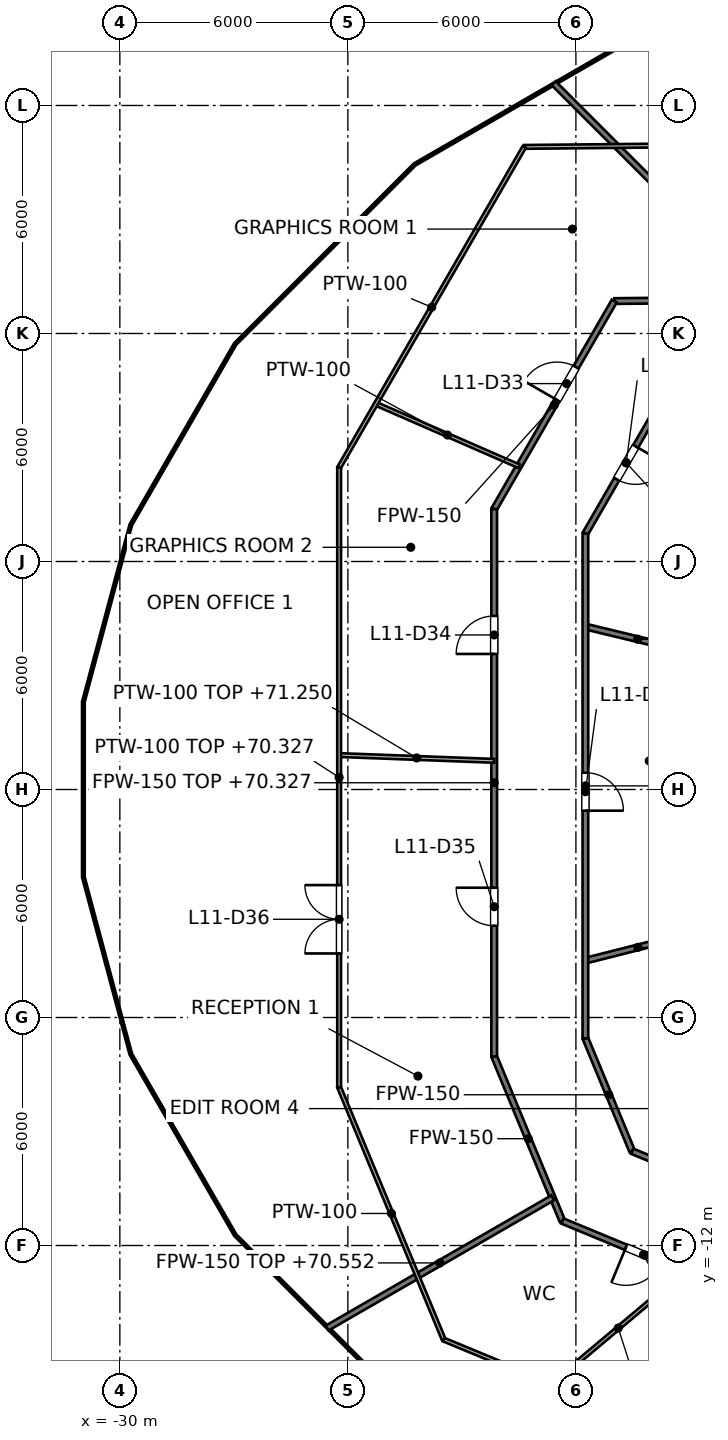
"""IFC4 building model, lengths in metres.
Left out: names, types, materials, properties, quantities, classifications, styles, units other than length and angle.
Written with IfcOpenShell. Run it as: python <this file> out.ifc"""

import sys

from ifc_helpers import new_model, si_unit, direction, frame, frame_2d, origin, place, context, subcontext, project, spatial, rectangle, extrude, element, fill, save


model = new_model("IFC4")
c1 = context("Model", 3, precision=1e-05, world=origin(), true_north=direction((0.0, 1.0)))
c2 = subcontext(c1, "Body", "Model", "MODEL_VIEW")
j1 = project(units=[si_unit("LENGTHUNIT", "METRE"), si_unit("PLANEANGLEUNIT", "RADIAN")], contexts=[c1])
p1 = place(None, origin())
s1 = spatial("IfcSite", under=j1, at=p1, CompositionType="ELEMENT")
p2 = place(p1, origin())
s2 = spatial("IfcBuilding", under=s1, at=p2, CompositionType="ELEMENT")
p3 = place(p2, frame((0.0, 0.0, 67.2)))
s3 = spatial("IfcBuildingStorey", under=s2, at=p3, CompositionType="ELEMENT", Elevation=67.2)
p4 = place(p3, frame((-20.15, -7.025, 0.0), z_axis=(0.0, 0.0, 1.0), x_axis=(0.382713655067, -0.923867013279, 0.0)))
e1 = element("IfcWall", 1, at=p4, inside=s3, PredefinedType="PARTITIONING", context=c2, shape_type="SweptSolid", body=[
    extrude(rectangle(XDim=4.688, YDim=0.15, at=frame_2d((2.344, 0.0))), origin(), (0.0, 0.0, 1.0), 3.195),
])
p5 = place(p3, frame((-17.75, -6.547, 0.0), z_axis=(0.0, 0.0, 1.0), x_axis=(0.382760687394, -0.923847528646, 0.0)))
e2 = element("IfcWall", 2, at=p5, inside=s3, PredefinedType="PARTITIONING", context=c2, shape_type="SweptSolid", body=[
    extrude(rectangle(XDim=3.217, YDim=0.15, at=frame_2d((1.608, 0.0))), origin(), (0.0, 0.0, 1.0), 3.195),
])
p6 = place(p3, frame((-18.584, 18.584, 0.0), z_axis=(0.0, 0.0, 1.0), x_axis=(0.707106781187, -0.707106781187, 0.0)))
e3 = element("IfcWall", 3, at=p6, inside=s3, PredefinedType="PARTITIONING", context=c2, shape_type="SweptSolid", body=[
    extrude(rectangle(XDim=8.047, YDim=0.15, at=frame_2d((4.023, 0.0))), origin(), (0.0, 0.0, 1.0), 3.276),
])
p7 = place(p3, frame((-18.355, -11.355, 0.0), z_axis=(0.0, 0.0, 1.0), x_axis=(0.923864073191, -0.382720752334, 0.0)))
e4 = element("IfcWall", 4, at=p7, inside=s3, PredefinedType="PARTITIONING", context=c2, shape_type="SweptSolid", body=[
    extrude(rectangle(XDim=4.714, YDim=0.15, at=frame_2d((2.357, 0.0))), origin(), (0.0, 0.0, 1.0), 3.195),
])
p8 = place(p7, frame((1.81, 0.0, 0.0)))
e5 = element("IfcOpeningElement", 5, at=p8, cuts=e4, PredefinedType="OPENING", context=c2, shape_type="SweptSolid", body=[
    extrude(rectangle(XDim=1.0, YDim=2.1, at=frame_2d((0.5, 1.05))), frame((0.0, 0.075, 0.0), z_axis=(0.0, -1.0, 0.0), x_axis=(1.0, 0.0, 0.0)), (0.0, 0.0, 1.0), 0.15),
])
p9 = place(p3, frame((-16.519, -9.519, 0.0), z_axis=(0.0, 0.0, 1.0), x_axis=(0.92385749043, -0.382736642322, 0.0)))
e6 = element("IfcWall", 6, at=p9, inside=s3, PredefinedType="PARTITIONING", context=c2, shape_type="SweptSolid", body=[
    extrude(rectangle(XDim=3.231, YDim=0.15, at=frame_2d((1.615, 0.0))), origin(), (0.0, 0.0, 1.0), 3.195),
])
p10 = place(p9, frame((1.113, 0.0, 0.0)))
e7 = element("IfcOpeningElement", 7, at=p10, cuts=e6, PredefinedType="OPENING", context=c2, shape_type="SweptSolid", body=[
    extrude(rectangle(XDim=1.0, YDim=2.1, at=frame_2d((0.5, 1.05))), frame((0.0, 0.075, 0.0), z_axis=(0.0, -1.0, 0.0), x_axis=(1.0, 0.0, 0.0)), (0.0, 0.0, 1.0), 0.15),
])
p11 = place(p3, frame((-17.75, 4.288, 0.0), z_axis=(0.0, 0.0, 1.0), x_axis=(0.972001384863, -0.234975121714, 0.0)))
e8 = element("IfcWall", 8, at=p11, inside=s3, PredefinedType="PARTITIONING", context=c2, shape_type="SweptSolid", body=[
    extrude(rectangle(XDim=2.829, YDim=0.15, at=frame_2d((1.415, 0.0))), origin(), (0.0, 0.0, 1.0), 3.127),
])
p12 = place(p3, frame((-16.99, 12.853, 0.0), z_axis=(0.0, 0.0, 1.0), x_axis=(0.999950928474, 0.009906596006, 0.0)))
e9 = element("IfcWall", 9, at=p12, inside=s3, PredefinedType="PARTITIONING", context=c2, shape_type="SweptSolid", body=[
    extrude(rectangle(XDim=31.347, YDim=0.15, at=frame_2d((15.674, 0.0))), origin(), (0.0, 0.0, 1.0), 3.127),
])
p13 = place(p12, frame((21.205, 0.0, 0.0)))
e10 = element("IfcOpeningElement", 10, at=p13, cuts=e9, PredefinedType="OPENING", context=c2, shape_type="SweptSolid", body=[
    extrude(rectangle(XDim=1.0, YDim=2.1, at=frame_2d((0.5, 1.05))), frame((0.0, 0.075, 0.0), z_axis=(0.0, -1.0, 0.0), x_axis=(1.0, 0.0, 0.0)), (0.0, 0.0, 1.0), 0.15),
])
p14 = place(p12, frame((11.736, 0.0, 0.0)))
e11 = element("IfcOpeningElement", 11, at=p14, cuts=e9, PredefinedType="OPENING", context=c2, shape_type="SweptSolid", body=[
    extrude(rectangle(XDim=1.0, YDim=2.1, at=frame_2d((0.5, 1.05))), frame((0.0, 0.075, 0.0), z_axis=(0.0, -1.0, 0.0), x_axis=(1.0, 0.0, 0.0)), (0.0, 0.0, 1.0), 0.15),
])
p15 = place(p3, frame((-17.75, -4.505, 0.0), z_axis=(0.0, 0.0, 1.0), x_axis=(0.969332355751, 0.24575350271, 0.0)))
e12 = element("IfcWall", 12, at=p15, inside=s3, PredefinedType="PARTITIONING", context=c2, shape_type="SweptSolid", body=[
    extrude(rectangle(XDim=2.837, YDim=0.15, at=frame_2d((1.418, 0.0))), origin(), (0.0, 0.0, 1.0), 4.05),
])
p16 = place(p3, frame((-24.546, -14.172, 0.0), z_axis=(0.0, 0.0, 1.0), x_axis=(0.866030233461, 0.499991634662, 0.0)))
e13 = element("IfcWall", 13, at=p16, inside=s3, PredefinedType="PARTITIONING", context=c2, shape_type="SweptSolid", body=[
    extrude(rectangle(XDim=6.856, YDim=0.15, at=frame_2d((3.428, 0.0))), origin(), (0.0, 0.0, 1.0), 3.352),
])
p17 = place(p3, frame((-17.75, 6.737, 0.0), z_axis=(0.0, 0.0, 1.0), x_axis=(0.500038958046, 0.866002910178, 0.0)))
e14 = element("IfcWall", 14, at=p17, inside=s3, PredefinedType="PARTITIONING", context=c2, shape_type="SweptSolid", body=[
    extrude(rectangle(XDim=4.296, YDim=0.15, at=frame_2d((2.148, 0.0))), origin(), (0.0, 0.0, 1.0), 3.195),
])
p18 = place(p17, frame((1.647, 0.0, 0.0)))
e15 = element("IfcOpeningElement", 15, at=p18, cuts=e14, PredefinedType="OPENING", context=c2, shape_type="SweptSolid", body=[
    extrude(rectangle(XDim=1.0, YDim=2.1, at=frame_2d((0.5, 1.05))), frame((0.0, 0.075, 0.0), z_axis=(0.0, -1.0, 0.0), x_axis=(1.0, 0.0, 0.0)), (0.0, 0.0, 1.0), 0.15),
])
p19 = place(p3, frame((-20.15, 7.38, 0.0), z_axis=(0.0, 0.0, 1.0), x_axis=(0.499998889324, 0.866026045033, 0.0)))
e16 = element("IfcWall", 16, at=p19, inside=s3, PredefinedType="PARTITIONING", context=c2, shape_type="SweptSolid", body=[
    extrude(rectangle(XDim=6.32, YDim=0.15, at=frame_2d((3.16, 0.0))), origin(), (0.0, 0.0, 1.0), 3.195),
])
p20 = place(p19, frame((3.312, 0.0, 0.0)))
e17 = element("IfcOpeningElement", 17, at=p20, cuts=e16, PredefinedType="OPENING", context=c2, shape_type="SweptSolid", body=[
    extrude(rectangle(XDim=1.0, YDim=2.1, at=frame_2d((0.5, 1.05))), frame((0.0, 0.075, 0.0), z_axis=(0.0, -1.0, 0.0), x_axis=(1.0, 0.0, 0.0)), (0.0, 0.0, 1.0), 0.15),
])
p21 = place(p3, frame((-17.75, -6.547, 0.0), z_axis=(0.0, 0.0, 1.0), x_axis=(0.0, 1.0, 0.0)))
e18 = element("IfcWall", 18, at=p21, inside=s3, PredefinedType="PARTITIONING", context=c2, shape_type="SweptSolid", body=[
    extrude(rectangle(XDim=13.284, YDim=0.15, at=frame_2d((6.642, 0.0))), origin(), (0.0, 0.0, 1.0), 3.127),
])
p22 = place(p21, frame((5.989, 0.0, 0.0)))
e19 = element("IfcOpeningElement", 19, at=p22, cuts=e18, PredefinedType="OPENING", context=c2, shape_type="SweptSolid", body=[
    extrude(rectangle(XDim=1.0, YDim=2.1, at=frame_2d((0.5, 1.05))), frame((0.0, 0.075, 0.0), z_axis=(0.0, -1.0, 0.0), x_axis=(1.0, 0.0, 0.0)), (0.0, 0.0, 1.0), 0.15),
])
p23 = place(p3, frame((-20.15, -7.025, 0.0), z_axis=(0.0, 0.0, 1.0), x_axis=(0.0, 1.0, 0.0)))
e20 = element("IfcWall", 20, at=p23, inside=s3, PredefinedType="PARTITIONING", context=c2, shape_type="SweptSolid", body=[
    extrude(rectangle(XDim=14.405, YDim=0.15, at=frame_2d((7.202, 0.0))), origin(), (0.0, 0.0, 1.0), 3.127),
])
p24 = place(p23, frame((10.592, 0.0, 0.0)))
e21 = element("IfcOpeningElement", 21, at=p24, cuts=e20, PredefinedType="OPENING", context=c2, shape_type="SweptSolid", body=[
    extrude(rectangle(XDim=1.0, YDim=2.1, at=frame_2d((0.5, 1.05))), frame((0.0, 0.075, 0.0), z_axis=(0.0, -1.0, 0.0), x_axis=(1.0, 0.0, 0.0)), (0.0, 0.0, 1.0), 0.15),
])
p25 = place(p23, frame((3.44, 0.0, 0.0)))
e22 = element("IfcOpeningElement", 22, at=p25, cuts=e20, PredefinedType="OPENING", context=c2, shape_type="SweptSolid", body=[
    extrude(rectangle(XDim=1.0, YDim=2.1, at=frame_2d((0.5, 1.05))), frame((0.0, 0.075, 0.0), z_axis=(0.0, -1.0, 0.0), x_axis=(1.0, 0.0, 0.0)), (0.0, 0.0, 1.0), 0.15),
])
p26 = place(p3, frame((-24.23, -7.837, 0.0), z_axis=(0.0, 0.0, 1.0), x_axis=(0.383020677741, -0.923739768779, 0.0)))
e23 = element("IfcWall", 23, at=p26, inside=s3, PredefinedType="PARTITIONING", context=c2, shape_type="SweptSolid", body=[
    extrude(rectangle(XDim=7.188, YDim=0.1, at=frame_2d((3.594, 0.0))), origin(), (0.0, 0.0, 1.0), 3.195),
])
p27 = place(p3, frame((-23.262, 10.149, 0.0), z_axis=(0.0, 0.0, 1.0), x_axis=(0.916554042033, -0.399910850105, 0.0)))
e24 = element("IfcWall", 24, at=p27, inside=s3, PredefinedType="PARTITIONING", context=c2, shape_type="SweptSolid", body=[
    extrude(rectangle(XDim=4.105, YDim=0.1, at=frame_2d((2.053, 0.0))), origin(), (0.0, 0.0, 1.0), 3.195),
])
p28 = place(p3, frame((-21.477, -14.477, 0.0), z_axis=(0.0, 0.0, 1.0), x_axis=(0.923776176895, -0.382932859653, 0.0)))
e25 = element("IfcWall", 25, at=p28, inside=s3, PredefinedType="PARTITIONING", context=c2, shape_type="SweptSolid", body=[
    extrude(rectangle(XDim=7.236, YDim=0.1, at=frame_2d((3.618, 0.0))), origin(), (0.0, 0.0, 1.0), 3.195),
])
p29 = place(p3, frame((-24.23, 0.906, 0.0), z_axis=(0.0, 0.0, 1.0), x_axis=(0.99930587629, -0.03725272624, 0.0)))
e26 = element("IfcWall", 26, at=p29, inside=s3, PredefinedType="PARTITIONING", context=c2, shape_type="SweptSolid", body=[
    extrude(rectangle(XDim=4.083, YDim=0.1, at=frame_2d((2.042, 0.0))), origin(), (0.0, 0.0, 1.0), 4.05),
])
p30 = place(p3, frame((-19.359, 16.91, 0.0), z_axis=(0.0, 0.0, 1.0), x_axis=(0.999950841495, 0.00991537161, 0.0)))
e27 = element("IfcWall", 27, at=p30, inside=s3, PredefinedType="PARTITIONING", context=c2, shape_type="SweptSolid", body=[
    extrude(rectangle(XDim=34.792, YDim=0.1, at=frame_2d((17.396, 0.0))), origin(), (0.0, 0.0, 1.0), 3.127),
])
p31 = place(p30, frame((26.576, 0.0, 0.0)))
e28 = element("IfcOpeningElement", 28, at=p31, cuts=e27, PredefinedType="OPENING", context=c2, shape_type="SweptSolid", body=[
    extrude(rectangle(XDim=0.9, YDim=2.1, at=frame_2d((0.45, 1.05))), frame((0.0, 0.05, 0.0), z_axis=(0.0, -1.0, 0.0), x_axis=(1.0, 0.0, 0.0)), (0.0, 0.0, 1.0), 0.1),
])
p32 = place(p30, frame((10.443, 0.0, 0.0)))
e29 = element("IfcOpeningElement", 29, at=p32, cuts=e27, PredefinedType="OPENING", context=c2, shape_type="SweptSolid", body=[
    extrude(rectangle(XDim=0.9, YDim=2.1, at=frame_2d((0.45, 1.05))), frame((0.0, 0.05, 0.0), z_axis=(0.0, -1.0, 0.0), x_axis=(1.0, 0.0, 0.0)), (0.0, 0.0, 1.0), 0.1),
])
p33 = place(p3, frame((-18.647, -15.65, 0.0), z_axis=(0.0, 0.0, 1.0), x_axis=(0.765988260728, 0.642854559312, 0.0)))
e30 = element("IfcWall", 30, at=p33, inside=s3, PredefinedType="PARTITIONING", context=c2, shape_type="SweptSolid", body=[
    extrude(rectangle(XDim=4.598, YDim=0.1, at=frame_2d((2.299, 0.0))), origin(), (0.0, 0.0, 1.0), 4.05),
])
p34 = place(p3, frame((-24.23, 8.473, 0.0), z_axis=(0.0, 0.0, 1.0), x_axis=(0.50004711357, 0.865998201044, 0.0)))
e31 = element("IfcWall", 31, at=p34, inside=s3, PredefinedType="PARTITIONING", context=c2, shape_type="SweptSolid", body=[
    extrude(rectangle(XDim=9.742, YDim=0.1, at=frame_2d((4.871, 0.0))), origin(), (0.0, 0.0, 1.0), 3.195),
])
p35 = place(p3, frame((-24.23, -7.837, 0.0), z_axis=(0.0, 0.0, 1.0), x_axis=(0.0, 1.0, 0.0)))
e32 = element("IfcWall", 32, at=p35, inside=s3, PredefinedType="PARTITIONING", context=c2, shape_type="SweptSolid", body=[
    extrude(rectangle(XDim=16.31, YDim=0.1, at=frame_2d((8.155, 0.0))), origin(), (0.0, 0.0, 1.0), 3.127),
])
p36 = place(p35, frame((3.522, 0.0, 0.0)))
e33 = element("IfcOpeningElement", 33, at=p36, cuts=e32, PredefinedType="OPENING", context=c2, shape_type="SweptSolid", body=[
    extrude(rectangle(XDim=1.8, YDim=2.1, at=frame_2d((0.9, 1.05))), frame((0.0, 0.05, 0.0), z_axis=(0.0, -1.0, 0.0), x_axis=(1.0, 0.0, 0.0)), (0.0, 0.0, 1.0), 0.1),
])
p37 = place(p18, origin())
e34 = element("IfcDoor", 34, at=p37, inside=s3, OperationType="SINGLE_SWING_RIGHT", PredefinedType="DOOR", context=c2, shape_type="SweptSolid", body=[
    extrude(rectangle(XDim=1.0, YDim=2.1, at=frame_2d((0.5, 1.05))), frame((0.0, 0.025, 0.0), z_axis=(0.0, -1.0, 0.0), x_axis=(1.0, 0.0, 0.0)), (0.0, 0.0, 1.0), 0.05),
])
fill(e15, e34)
p38 = place(p22, origin())
e35 = element("IfcDoor", 35, at=p38, inside=s3, OperationType="SINGLE_SWING_LEFT", PredefinedType="DOOR", context=c2, shape_type="SweptSolid", body=[
    extrude(rectangle(XDim=1.0, YDim=2.1, at=frame_2d((0.5, 1.05))), frame((0.0, 0.025, 0.0), z_axis=(0.0, -1.0, 0.0), x_axis=(1.0, 0.0, 0.0)), (0.0, 0.0, 1.0), 0.05),
])
fill(e19, e35)
p39 = place(p20, origin())
e36 = element("IfcDoor", 36, at=p39, inside=s3, OperationType="SINGLE_SWING_LEFT", PredefinedType="DOOR", context=c2, shape_type="SweptSolid", body=[
    extrude(rectangle(XDim=1.0, YDim=2.1, at=frame_2d((0.5, 1.05))), frame((0.0, 0.025, 0.0), z_axis=(0.0, -1.0, 0.0), x_axis=(1.0, 0.0, 0.0)), (0.0, 0.0, 1.0), 0.05),
])
fill(e17, e36)
p40 = place(p24, origin())
e37 = element("IfcDoor", 37, at=p40, inside=s3, OperationType="SINGLE_SWING_LEFT", PredefinedType="DOOR", context=c2, shape_type="SweptSolid", body=[
    extrude(rectangle(XDim=1.0, YDim=2.1, at=frame_2d((0.5, 1.05))), frame((0.0, 0.025, 0.0), z_axis=(0.0, -1.0, 0.0), x_axis=(1.0, 0.0, 0.0)), (0.0, 0.0, 1.0), 0.05),
])
fill(e21, e37)
p41 = place(p25, origin())
e38 = element("IfcDoor", 38, at=p41, inside=s3, OperationType="SINGLE_SWING_RIGHT", PredefinedType="DOOR", context=c2, shape_type="SweptSolid", body=[
    extrude(rectangle(XDim=1.0, YDim=2.1, at=frame_2d((0.5, 1.05))), frame((0.0, 0.025, 0.0), z_axis=(0.0, -1.0, 0.0), x_axis=(1.0, 0.0, 0.0)), (0.0, 0.0, 1.0), 0.05),
])
fill(e22, e38)
p42 = place(p36, origin())
e39 = element("IfcDoor", 39, at=p42, inside=s3, OperationType="DOUBLE_DOOR_SINGLE_SWING", PredefinedType="DOOR", context=c2, shape_type="SweptSolid", body=[
    extrude(rectangle(XDim=1.8, YDim=2.1, at=frame_2d((0.9, 1.05))), frame((0.0, 0.025, 0.0), z_axis=(0.0, -1.0, 0.0), x_axis=(1.0, 0.0, 0.0)), (0.0, 0.0, 1.0), 0.05),
])
fill(e33, e39)
p43 = place(p8, origin())
e40 = element("IfcDoor", 40, at=p43, inside=s3, OperationType="SINGLE_SWING_LEFT", PredefinedType="DOOR", context=c2, shape_type="SweptSolid", body=[
    extrude(rectangle(XDim=1.0, YDim=2.1, at=frame_2d((0.5, 1.05))), frame((0.0, 0.025, 0.0), z_axis=(0.0, -1.0, 0.0), x_axis=(1.0, 0.0, 0.0)), (0.0, 0.0, 1.0), 0.05),
])
fill(e5, e40)
save(model, sys.argv[1])
